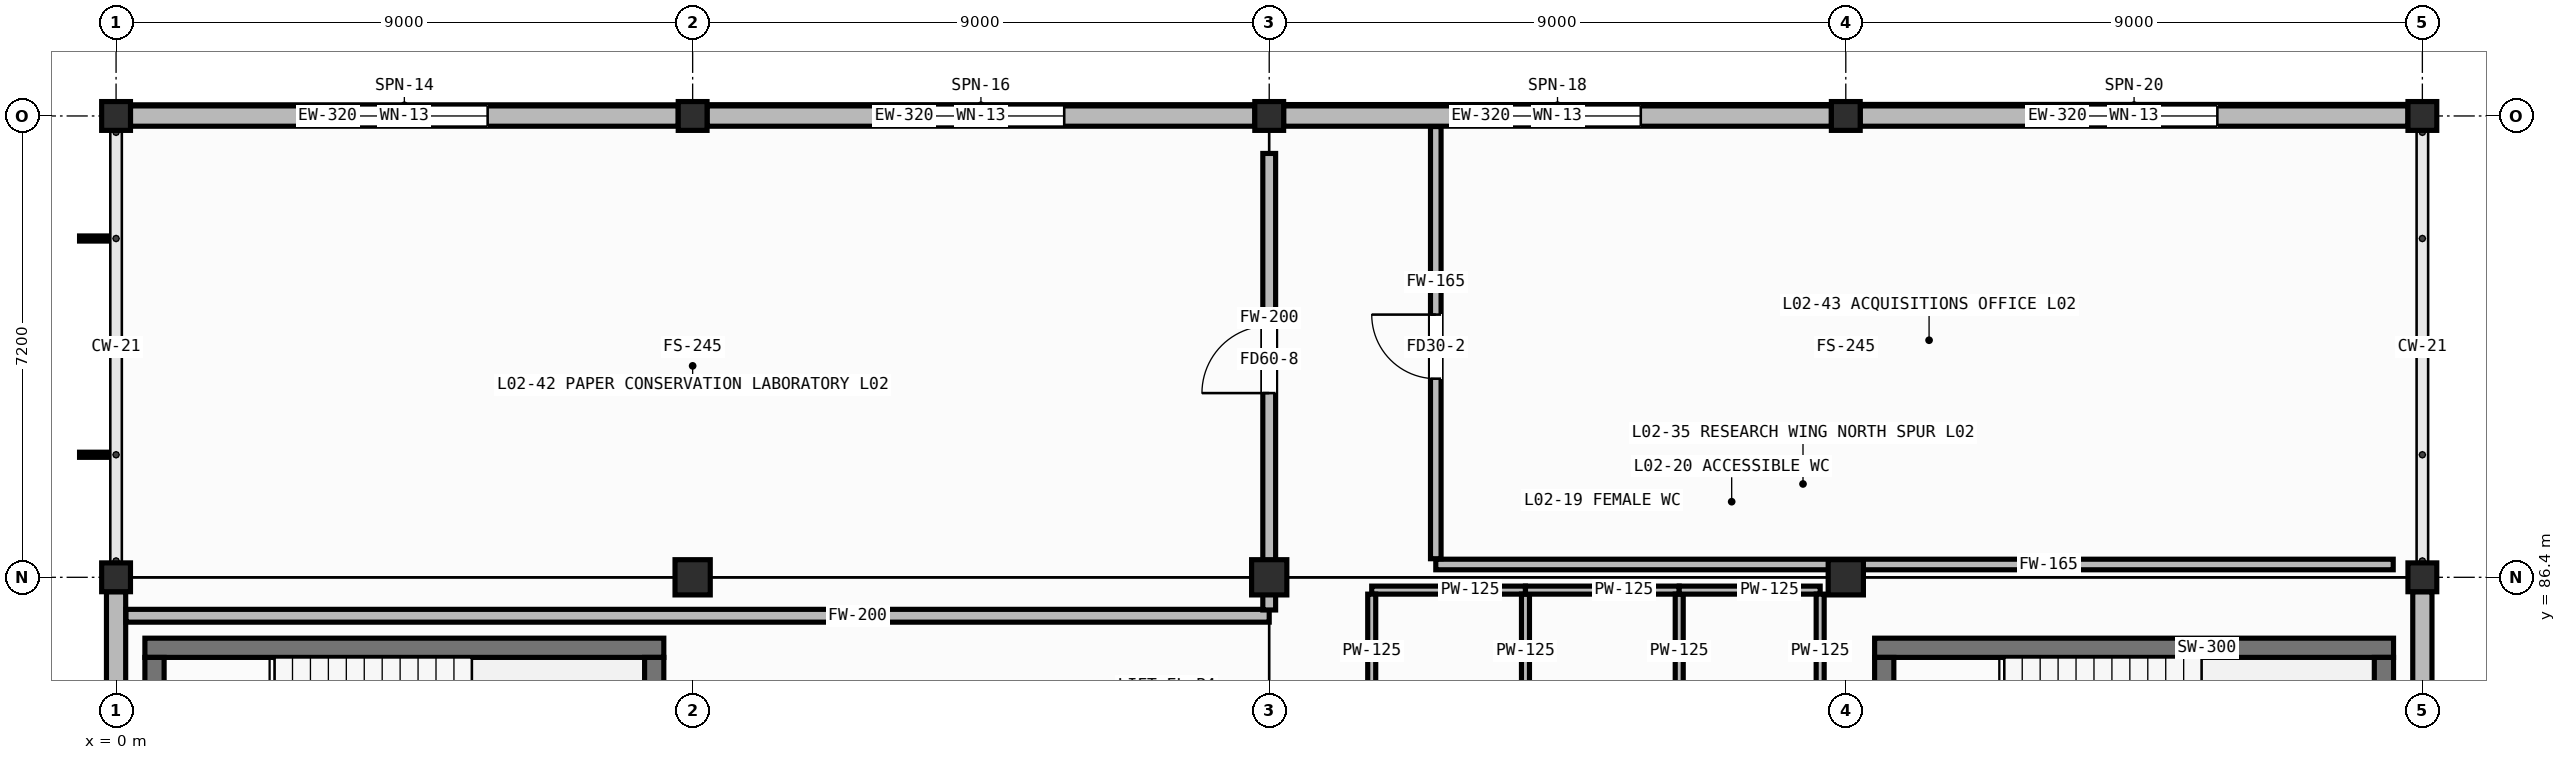
"""IFC4 building model, lengths in metres.
Left out: names, types, materials, properties, quantities, classifications, styles, units other than length and angle.
Written with IfcOpenShell. Run it as: python <this file> out.ifc"""

import sys

from ifc_helpers import new_model, si_unit, direction, frame, frame_2d, origin, origin_2d, place, context, subcontext, project, spatial, rectangle, hollow_rectangle, extrude, element, fill, save


model = new_model("IFC4")
c1 = context("Model", 3, precision=1e-05, world=origin(), true_north=direction((0.0, 1.0)))
c2 = subcontext(c1, "Body", "Model", "MODEL_VIEW")
j1 = project(units=[si_unit("LENGTHUNIT", "METRE"), si_unit("PLANEANGLEUNIT", "RADIAN")], contexts=[c1])
p1 = place(None, origin())
s1 = spatial("IfcSite", under=j1, at=p1, CompositionType="ELEMENT")
p2 = place(p1, origin())
s2 = spatial("IfcBuilding", under=s1, at=p2, CompositionType="ELEMENT")
p3 = place(p2, frame((0.0, 0.0, 4.8)))
s3 = spatial("IfcBuildingStorey", under=s2, at=p3, CompositionType="ELEMENT", Elevation=4.8)
for number, where, z_axis, x_axis in (
    (1, (0.0, 86.4, 0.0), (0.0, 0.0, 1.0), (1.0, 0.0, 0.0)),
    (2, (0.0, 93.6, 0.0), (0.0, 0.0, 1.0), (1.0, 0.0, 0.0)),
):
    element("IfcColumn", number, at=place(p3, frame(where, z_axis=z_axis, x_axis=x_axis)), inside=s3, PredefinedType="COLUMN", context=c2, shape_type="SweptSolid", body=[
        extrude(hollow_rectangle(XDim=0.45, YDim=0.45, WallThickness=0.019, at=origin_2d()), origin(), (0.0, 0.0, 1.0), 4.0),
    ])
p4 = place(p3, frame((9.0, 86.4, 0.0), z_axis=(0.0, 0.0, 1.0), x_axis=(1.0, 0.0, 0.0)))
e3 = element("IfcColumn", 3, at=p4, inside=s3, PredefinedType="COLUMN", context=c2, shape_type="SweptSolid", body=[
    extrude(hollow_rectangle(XDim=0.55, YDim=0.55, WallThickness=0.022, at=origin_2d()), origin(), (0.0, 0.0, 1.0), 4.0),
])
p5 = place(p3, frame((9.0, 93.6, 0.0), z_axis=(0.0, 0.0, 1.0), x_axis=(1.0, 0.0, 0.0)))
e4 = element("IfcColumn", 4, at=p5, inside=s3, PredefinedType="COLUMN", context=c2, shape_type="SweptSolid", body=[
    extrude(hollow_rectangle(XDim=0.45, YDim=0.45, WallThickness=0.019, at=origin_2d()), origin(), (0.0, 0.0, 1.0), 4.0),
])
p6 = place(p3, frame((18.0, 86.4, 0.0), z_axis=(0.0, 0.0, 1.0), x_axis=(1.0, 0.0, 0.0)))
e5 = element("IfcColumn", 5, at=p6, inside=s3, PredefinedType="COLUMN", context=c2, shape_type="SweptSolid", body=[
    extrude(hollow_rectangle(XDim=0.55, YDim=0.55, WallThickness=0.022, at=origin_2d()), origin(), (0.0, 0.0, 1.0), 4.0),
])
p7 = place(p3, frame((18.0, 93.6, 0.0), z_axis=(0.0, 0.0, 1.0), x_axis=(1.0, 0.0, 0.0)))
e6 = element("IfcColumn", 6, at=p7, inside=s3, PredefinedType="COLUMN", context=c2, shape_type="SweptSolid", body=[
    extrude(hollow_rectangle(XDim=0.45, YDim=0.45, WallThickness=0.019, at=origin_2d()), origin(), (0.0, 0.0, 1.0), 4.0),
])
p8 = place(p3, frame((27.0, 86.4, 0.0), z_axis=(0.0, 0.0, 1.0), x_axis=(1.0, 0.0, 0.0)))
e7 = element("IfcColumn", 7, at=p8, inside=s3, PredefinedType="COLUMN", context=c2, shape_type="SweptSolid", body=[
    extrude(hollow_rectangle(XDim=0.55, YDim=0.55, WallThickness=0.022, at=origin_2d()), origin(), (0.0, 0.0, 1.0), 4.0),
])
for number, where, z_axis, x_axis in (
    (8, (27.0, 93.6, 0.0), (0.0, 0.0, 1.0), (1.0, 0.0, 0.0)),
    (9, (36.0, 86.4, 0.0), (0.0, 0.0, 1.0), (1.0, 0.0, 0.0)),
    (10, (36.0, 93.6, 0.0), (0.0, 0.0, 1.0), (1.0, 0.0, 0.0)),
):
    element("IfcColumn", number, at=place(p3, frame(where, z_axis=z_axis, x_axis=x_axis)), inside=s3, PredefinedType="COLUMN", context=c2, shape_type="SweptSolid", body=[
        extrude(hollow_rectangle(XDim=0.45, YDim=0.45, WallThickness=0.019, at=origin_2d()), origin(), (0.0, 0.0, 1.0), 4.0),
    ])
p9 = place(p3, frame((8.775, 93.6, 0.0), z_axis=(0.0, 0.0, 1.0), x_axis=(-1.0, 0.0, 0.0)))
e11 = element("IfcWall", 11, at=p9, inside=s3, PredefinedType="STANDARD", context=c2, shape_type="SweptSolid", body=[
    extrude(rectangle(XDim=8.55, YDim=0.32, at=frame_2d((4.275, 0.0))), origin(), (0.0, 0.0, 1.0), 3.255),
])
p10 = place(p9, frame((2.975, 0.0, 0.85)))
e12 = element("IfcOpeningElement", 12, at=p10, cuts=e11, PredefinedType="OPENING", context=c2, shape_type="SweptSolid", body=[
    extrude(rectangle(XDim=2.6, YDim=1.6, at=frame_2d((1.3, 0.8))), frame((0.0, 0.172, 0.0), z_axis=(0.0, -1.0, 0.0), x_axis=(1.0, 0.0, 0.0)), (0.0, 0.0, 1.0), 0.344),
])
p11 = place(p3, frame((17.775, 93.6, 0.0), z_axis=(0.0, 0.0, 1.0), x_axis=(-1.0, 0.0, 0.0)))
e13 = element("IfcWall", 13, at=p11, inside=s3, PredefinedType="STANDARD", context=c2, shape_type="SweptSolid", body=[
    extrude(rectangle(XDim=8.55, YDim=0.32, at=frame_2d((4.275, 0.0))), origin(), (0.0, 0.0, 1.0), 3.255),
])
p12 = place(p11, frame((2.975, 0.0, 0.85)))
e14 = element("IfcOpeningElement", 14, at=p12, cuts=e13, PredefinedType="OPENING", context=c2, shape_type="SweptSolid", body=[
    extrude(rectangle(XDim=2.6, YDim=1.6, at=frame_2d((1.3, 0.8))), frame((0.0, 0.172, 0.0), z_axis=(0.0, -1.0, 0.0), x_axis=(1.0, 0.0, 0.0)), (0.0, 0.0, 1.0), 0.344),
])
p13 = place(p3, frame((26.775, 93.6, 0.0), z_axis=(0.0, 0.0, 1.0), x_axis=(-1.0, 0.0, 0.0)))
e15 = element("IfcWall", 15, at=p13, inside=s3, PredefinedType="STANDARD", context=c2, shape_type="SweptSolid", body=[
    extrude(rectangle(XDim=8.55, YDim=0.32, at=frame_2d((4.275, 0.0))), origin(), (0.0, 0.0, 1.0), 3.255),
])
p14 = place(p13, frame((2.975, 0.0, 0.85)))
e16 = element("IfcOpeningElement", 16, at=p14, cuts=e15, PredefinedType="OPENING", context=c2, shape_type="SweptSolid", body=[
    extrude(rectangle(XDim=2.6, YDim=1.6, at=frame_2d((1.3, 0.8))), frame((0.0, 0.172, 0.0), z_axis=(0.0, -1.0, 0.0), x_axis=(1.0, 0.0, 0.0)), (0.0, 0.0, 1.0), 0.344),
])
p15 = place(p3, frame((35.775, 93.6, 0.0), z_axis=(0.0, 0.0, 1.0), x_axis=(-1.0, 0.0, 0.0)))
e17 = element("IfcWall", 17, at=p15, inside=s3, PredefinedType="STANDARD", context=c2, shape_type="SweptSolid", body=[
    extrude(rectangle(XDim=8.55, YDim=0.32, at=frame_2d((4.275, 0.0))), origin(), (0.0, 0.0, 1.0), 3.255),
])
p16 = place(p15, frame((2.975, 0.0, 0.85)))
e18 = element("IfcOpeningElement", 18, at=p16, cuts=e17, PredefinedType="OPENING", context=c2, shape_type="SweptSolid", body=[
    extrude(rectangle(XDim=2.6, YDim=1.6, at=frame_2d((1.3, 0.8))), frame((0.0, 0.172, 0.0), z_axis=(0.0, -1.0, 0.0), x_axis=(1.0, 0.0, 0.0)), (0.0, 0.0, 1.0), 0.344),
])
for number, where, z_axis, x_axis in (
    (19, (0.0, 79.425, 0.0), (0.0, 0.0, 1.0), (0.0, 1.0, 0.0)),
    (20, (36.0, 86.175, 0.0), (0.0, 0.0, 1.0), (0.0, -1.0, 0.0)),
):
    element("IfcWall", number, at=place(p3, frame(where, z_axis=z_axis, x_axis=x_axis)), inside=s3, PredefinedType="STANDARD", context=c2, shape_type="SweptSolid", body=[
        extrude(rectangle(XDim=6.75, YDim=0.3, at=frame_2d((3.375, 0.0))), origin(), (0.0, 0.0, 1.0), 3.255),
    ])
p17 = place(p3, frame((0.45, 85.3, 0.0), z_axis=(0.0, 0.0, 1.0), x_axis=(1.0, 0.0, 0.0)))
e21 = element("IfcWall", 21, at=p17, inside=s3, PredefinedType="SHEAR", context=c2, shape_type="SweptSolid", body=[
    extrude(rectangle(XDim=8.1, YDim=0.3, at=frame_2d((4.05, 0.0))), origin(), (0.0, 0.0, 1.0), 3.755),
])
for number, where, z_axis, x_axis in (
    (22, (0.6, 81.35, 0.0), (0.0, 0.0, 1.0), (0.0, 1.0, 0.0)),
    (23, (8.4, 81.35, 0.0), (0.0, 0.0, 1.0), (0.0, 1.0, 0.0)),
):
    element("IfcWall", number, at=place(p3, frame(where, z_axis=z_axis, x_axis=x_axis)), inside=s3, PredefinedType="SHEAR", context=c2, shape_type="SweptSolid", body=[
        extrude(rectangle(XDim=3.8, YDim=0.3, at=frame_2d((1.9, 0.0))), origin(), (0.0, 0.0, 1.0), 3.755),
    ])
p18 = place(p3, frame((27.45, 85.3, 0.0), z_axis=(0.0, 0.0, 1.0), x_axis=(1.0, 0.0, 0.0)))
e24 = element("IfcWall", 24, at=p18, inside=s3, PredefinedType="SHEAR", context=c2, shape_type="SweptSolid", body=[
    extrude(rectangle(XDim=8.1, YDim=0.3, at=frame_2d((4.05, 0.0))), origin(), (0.0, 0.0, 1.0), 3.755),
])
for number, where, z_axis, x_axis in (
    (25, (27.6, 81.35, 0.0), (0.0, 0.0, 1.0), (0.0, 1.0, 0.0)),
    (26, (35.4, 81.35, 0.0), (0.0, 0.0, 1.0), (0.0, 1.0, 0.0)),
):
    element("IfcWall", number, at=place(p3, frame(where, z_axis=z_axis, x_axis=x_axis)), inside=s3, PredefinedType="SHEAR", context=c2, shape_type="SweptSolid", body=[
        extrude(rectangle(XDim=3.8, YDim=0.3, at=frame_2d((1.9, 0.0))), origin(), (0.0, 0.0, 1.0), 3.755),
    ])
p19 = place(p3, frame((19.6, 86.2, 0.0), z_axis=(0.0, 0.0, 1.0), x_axis=(1.0, 0.0, 0.0)))
e27 = element("IfcWall", 27, at=p19, inside=s3, PredefinedType="PARTITIONING", context=c2, shape_type="SweptSolid", body=[
    extrude(rectangle(XDim=2.4, YDim=0.125, at=frame_2d((1.2, 0.0))), origin(), (0.0, 0.0, 1.0), 3.035),
])
for number, where, z_axis, x_axis in (
    (28, (19.6, 83.69, 0.0), (0.0, 0.0, 1.0), (0.0, 1.0, 0.0)),
    (29, (22.0, 83.69, 0.0), (0.0, 0.0, 1.0), (0.0, 1.0, 0.0)),
):
    element("IfcWall", number, at=place(p3, frame(where, z_axis=z_axis, x_axis=x_axis)), inside=s3, PredefinedType="PARTITIONING", context=c2, shape_type="SweptSolid", body=[
        extrude(rectangle(XDim=2.448, YDim=0.125, at=frame_2d((1.224, 0.0))), origin(), (0.0, 0.0, 1.0), 3.755),
    ])
p20 = place(p3, frame((22.0, 86.2, 0.0), z_axis=(0.0, 0.0, 1.0), x_axis=(1.0, 0.0, 0.0)))
e30 = element("IfcWall", 30, at=p20, inside=s3, PredefinedType="PARTITIONING", context=c2, shape_type="SweptSolid", body=[
    extrude(rectangle(XDim=2.4, YDim=0.125, at=frame_2d((1.2, 0.0))), origin(), (0.0, 0.0, 1.0), 3.035),
])
p21 = place(p3, frame((24.4, 83.69, 0.0), z_axis=(0.0, 0.0, 1.0), x_axis=(0.0, 1.0, 0.0)))
e31 = element("IfcWall", 31, at=p21, inside=s3, PredefinedType="PARTITIONING", context=c2, shape_type="SweptSolid", body=[
    extrude(rectangle(XDim=2.448, YDim=0.125, at=frame_2d((1.224, 0.0))), origin(), (0.0, 0.0, 1.0), 3.755),
])
p22 = place(p3, frame((24.4, 86.2, 0.0), z_axis=(0.0, 0.0, 1.0), x_axis=(1.0, 0.0, 0.0)))
e32 = element("IfcWall", 32, at=p22, inside=s3, PredefinedType="PARTITIONING", context=c2, shape_type="SweptSolid", body=[
    extrude(rectangle(XDim=2.2, YDim=0.125, at=frame_2d((1.1, 0.0))), origin(), (0.0, 0.0, 1.0), 3.035),
])
p23 = place(p3, frame((26.6, 83.69, 0.0), z_axis=(0.0, 0.0, 1.0), x_axis=(0.0, 1.0, 0.0)))
e33 = element("IfcWall", 33, at=p23, inside=s3, PredefinedType="PARTITIONING", context=c2, shape_type="SweptSolid", body=[
    extrude(rectangle(XDim=2.448, YDim=0.125, at=frame_2d((1.224, 0.0))), origin(), (0.0, 0.0, 1.0), 3.755),
])
p24 = place(p3, frame((0.155, 85.8, 0.0), z_axis=(0.0, 0.0, 1.0), x_axis=(1.0, 0.0, 0.0)))
e34 = element("IfcWall", 34, at=p24, inside=s3, PredefinedType="PARTITIONING", context=c2, shape_type="SweptSolid", body=[
    extrude(rectangle(XDim=17.845, YDim=0.2, at=frame_2d((8.922, 0.0))), origin(), (0.0, 0.0, 1.0), 3.755),
])
p25 = place(p3, frame((18.0, 85.89, 0.0), z_axis=(0.0, 0.0, 1.0), x_axis=(0.0, 1.0, 0.0)))
e35 = element("IfcWall", 35, at=p25, inside=s3, PredefinedType="PARTITIONING", context=c2, shape_type="SweptSolid", body=[
    extrude(rectangle(XDim=7.125, YDim=0.2, at=frame_2d((3.562, 0.0))), origin(), (0.0, 0.0, 1.0), 3.035),
])
p26 = place(p25, frame((3.385, 0.0, 0.0)))
e36 = element("IfcOpeningElement", 36, at=p26, cuts=e35, PredefinedType="OPENING", context=c2, shape_type="SweptSolid", body=[
    extrude(rectangle(XDim=1.05, YDim=2.02, at=frame_2d((0.525, 1.01))), frame((0.0, 0.112, 0.0), z_axis=(0.0, -1.0, 0.0), x_axis=(1.0, 0.0, 0.0)), (0.0, 0.0, 1.0), 0.224),
])
p27 = place(p3, frame((20.6, 86.6, 0.0), z_axis=(0.0, 0.0, 1.0), x_axis=(1.0, 0.0, 0.0)))
e37 = element("IfcWall", 37, at=p27, inside=s3, PredefinedType="PARTITIONING", context=c2, shape_type="SweptSolid", body=[
    extrude(rectangle(XDim=14.945, YDim=0.165, at=frame_2d((7.472, 0.0))), origin(), (0.0, 0.0, 1.0), 3.035),
])
p28 = place(p3, frame((20.6, 86.69, 0.0), z_axis=(0.0, 0.0, 1.0), x_axis=(0.0, 1.0, 0.0)))
e38 = element("IfcWall", 38, at=p28, inside=s3, PredefinedType="PARTITIONING", context=c2, shape_type="SweptSolid", body=[
    extrude(rectangle(XDim=6.745, YDim=0.165, at=frame_2d((3.373, 0.0))), origin(), (0.0, 0.0, 1.0), 3.755),
])
p29 = place(p28, frame((2.81, 0.0, 0.0)))
e39 = element("IfcOpeningElement", 39, at=p29, cuts=e38, PredefinedType="OPENING", context=c2, shape_type="SweptSolid", body=[
    extrude(rectangle(XDim=1.0, YDim=2.08, at=frame_2d((0.5, 1.04))), frame((0.0, 0.094, 0.0), z_axis=(0.0, -1.0, 0.0), x_axis=(1.0, 0.0, 0.0)), (0.0, 0.0, 1.0), 0.189),
])
p30 = place(p10, origin())
e40 = element("IfcWindow", 40, at=p30, inside=s3, PartitioningType="DOUBLE_PANEL_VERTICAL", PredefinedType="WINDOW", context=c2, shape_type="SweptSolid", body=[
    extrude(rectangle(XDim=2.6, YDim=1.6, at=frame_2d((1.3, 0.8))), frame((0.0, 0.03, 0.0), z_axis=(0.0, -1.0, 0.0), x_axis=(1.0, 0.0, 0.0)), (0.0, 0.0, 1.0), 0.06),
])
fill(e12, e40)
p31 = place(p12, origin())
e41 = element("IfcWindow", 41, at=p31, inside=s3, PartitioningType="DOUBLE_PANEL_VERTICAL", PredefinedType="WINDOW", context=c2, shape_type="SweptSolid", body=[
    extrude(rectangle(XDim=2.6, YDim=1.6, at=frame_2d((1.3, 0.8))), frame((0.0, 0.03, 0.0), z_axis=(0.0, -1.0, 0.0), x_axis=(1.0, 0.0, 0.0)), (0.0, 0.0, 1.0), 0.06),
])
fill(e14, e41)
p32 = place(p14, origin())
e42 = element("IfcWindow", 42, at=p32, inside=s3, PartitioningType="DOUBLE_PANEL_VERTICAL", PredefinedType="WINDOW", context=c2, shape_type="SweptSolid", body=[
    extrude(rectangle(XDim=2.6, YDim=1.6, at=frame_2d((1.3, 0.8))), frame((0.0, 0.03, 0.0), z_axis=(0.0, -1.0, 0.0), x_axis=(1.0, 0.0, 0.0)), (0.0, 0.0, 1.0), 0.06),
])
fill(e16, e42)
p33 = place(p16, origin())
e43 = element("IfcWindow", 43, at=p33, inside=s3, PartitioningType="DOUBLE_PANEL_VERTICAL", PredefinedType="WINDOW", context=c2, shape_type="SweptSolid", body=[
    extrude(rectangle(XDim=2.6, YDim=1.6, at=frame_2d((1.3, 0.8))), frame((0.0, 0.03, 0.0), z_axis=(0.0, -1.0, 0.0), x_axis=(1.0, 0.0, 0.0)), (0.0, 0.0, 1.0), 0.06),
])
fill(e18, e43)
p34 = place(p26, origin())
e44 = element("IfcDoor", 44, at=p34, inside=s3, OperationType="SINGLE_SWING_LEFT", PredefinedType="DOOR", context=c2, shape_type="SweptSolid", body=[
    extrude(rectangle(XDim=1.05, YDim=2.02, at=frame_2d((0.525, 1.01))), frame((0.0, 0.025, 0.0), z_axis=(0.0, -1.0, 0.0), x_axis=(1.0, 0.0, 0.0)), (0.0, 0.0, 1.0), 0.05),
])
fill(e36, e44)
p35 = place(p29, origin())
e45 = element("IfcDoor", 45, at=p35, inside=s3, OperationType="SINGLE_SWING_RIGHT", PredefinedType="DOOR", context=c2, shape_type="SweptSolid", body=[
    extrude(rectangle(XDim=1.0, YDim=2.08, at=frame_2d((0.5, 1.04))), frame((0.0, 0.025, 0.0), z_axis=(0.0, -1.0, 0.0), x_axis=(1.0, 0.0, 0.0)), (0.0, 0.0, 1.0), 0.05),
])
fill(e39, e45)
save(model, sys.argv[1])
